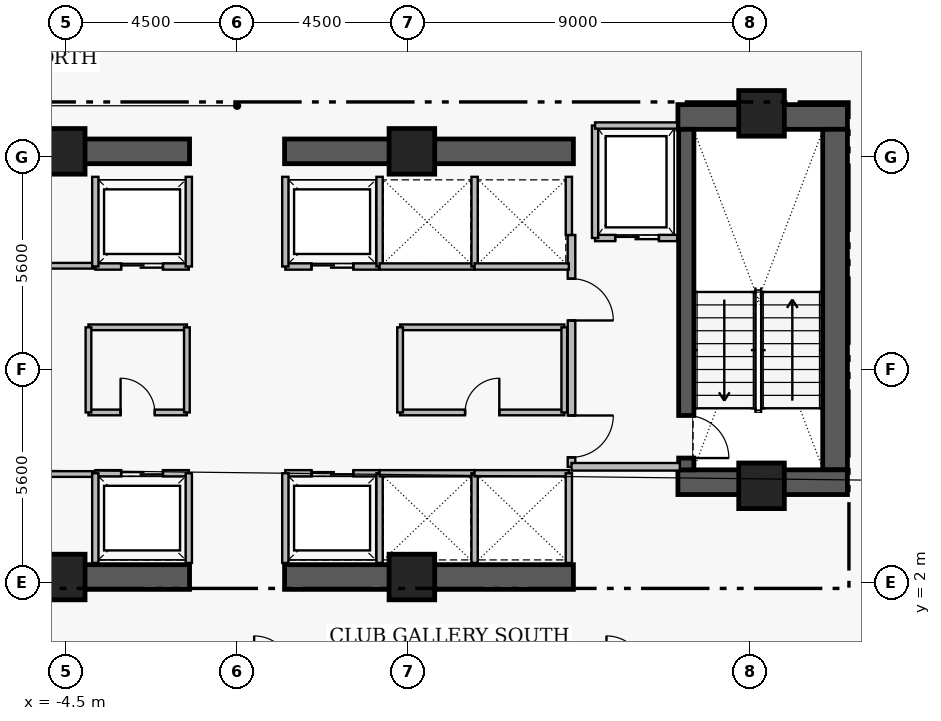
"""IFC4 building model, lengths in metres.
Left out: names, types, materials, properties, quantities, classifications, styles, units other than length and angle.
Written with IfcOpenShell. Run it as: python <this file> out.ifc"""

import sys

from ifc_helpers import new_model, si_unit, direction, frame, frame_2d, origin, origin_2d, place, context, subcontext, project, spatial, rectangle, extrude, element, fill, save


model = new_model("IFC4")
c1 = context("Model", 3, precision=1e-05, world=origin(), true_north=direction((0.0, 1.0)))
c2 = subcontext(c1, "Body", "Model", "MODEL_VIEW")
j1 = project(units=[si_unit("LENGTHUNIT", "METRE"), si_unit("PLANEANGLEUNIT", "RADIAN")], contexts=[c1])
p1 = place(None, origin())
s1 = spatial("IfcSite", under=j1, at=p1, CompositionType="ELEMENT")
p2 = place(p1, origin())
s2 = spatial("IfcBuilding", under=s1, at=p2, CompositionType="ELEMENT")
p3 = place(p2, frame((0.0, 0.0, 181.15)))
s3 = spatial("IfcBuildingStorey", under=s2, at=p3, CompositionType="ELEMENT", Elevation=181.15)
p4 = place(p3, frame((11.6, 14.255, 0.0), z_axis=(0.0, 0.0, 1.0), x_axis=(1.0, 0.0, 0.0)))
e1 = element("IfcWall", 1, at=p4, inside=s3, PredefinedType="SHEAR", context=c2, shape_type="SweptSolid", body=[
    extrude(rectangle(XDim=4.46, YDim=0.65, at=frame_2d((2.23, 0.0))), origin(), (0.0, 0.0, 1.0), 3.56),
])
p5 = place(p3, frame((15.735, 4.97, 0.0), z_axis=(0.0, 0.0, 1.0), x_axis=(0.0, 1.0, 0.0)))
e2 = element("IfcWall", 2, at=p5, inside=s3, PredefinedType="SHEAR", context=c2, shape_type="SweptSolid", body=[
    extrude(rectangle(XDim=8.96, YDim=0.65, at=frame_2d((4.48, 0.0))), origin(), (0.0, 0.0, 1.0), 3.56),
])
p6 = place(p3, frame((11.6, 4.645, 0.0), z_axis=(0.0, 0.0, 1.0), x_axis=(1.0, 0.0, 0.0)))
e3 = element("IfcWall", 3, at=p6, inside=s3, PredefinedType="SHEAR", context=c2, shape_type="SweptSolid", body=[
    extrude(rectangle(XDim=4.46, YDim=0.65, at=frame_2d((2.23, 0.0))), origin(), (0.0, 0.0, 1.0), 3.56),
])
for number, where, z_axis, x_axis in (
    (4, (-8.85, 2.15, 0.0), (0.0, 0.0, 1.0), (1.0, 0.0, 0.0)),
    (5, (1.25, 2.15, 0.0), (0.0, 0.0, 1.0), (1.0, 0.0, 0.0)),
    (6, (-8.85, 13.35, 0.0), (0.0, 0.0, 1.0), (1.0, 0.0, 0.0)),
    (7, (1.25, 13.35, 0.0), (0.0, 0.0, 1.0), (1.0, 0.0, 0.0)),
):
    element("IfcWall", number, at=place(p3, frame(where, z_axis=z_axis, x_axis=x_axis)), inside=s3, PredefinedType="SHEAR", context=c2, shape_type="SweptSolid", body=[
        extrude(rectangle(XDim=7.6, YDim=0.65, at=frame_2d((3.8, 0.0))), origin(), (0.0, 0.0, 1.0), 3.53),
    ])
p7 = place(p3, frame((11.82, 13.93, 0.0), z_axis=(0.0, 0.0, 1.0), x_axis=(0.0, -1.0, 0.0)))
e8 = element("IfcWall", 8, at=p7, inside=s3, PredefinedType="SHEAR", context=c2, shape_type="SweptSolid", body=[
    extrude(rectangle(XDim=8.96, YDim=0.4, at=frame_2d((4.48, 0.0))), origin(), (0.0, 0.0, 1.0), 3.56),
])
p8 = place(p7, frame((7.53, 0.0, 0.0)))
e9 = element("IfcOpeningElement", 9, at=p8, cuts=e8, PredefinedType="OPENING", context=c2, shape_type="SweptSolid", body=[
    extrude(rectangle(XDim=1.12, YDim=2.22, at=frame_2d((0.56, 1.11))), frame((0.0, 0.21, 0.0), z_axis=(0.0, -1.0, 0.0), x_axis=(1.0, 0.0, 0.0)), (0.0, 0.0, 1.0), 0.42),
])
for number, where, z_axis, x_axis in (
    (10, (-4.6, 13.35, 0.0), (0.0, 0.0, 1.0), (1.0, 0.0, 0.0)),
    (11, (4.6, 13.35, 0.0), (0.0, 0.0, 1.0), (1.0, 0.0, 0.0)),
    (12, (13.8, 14.35, 0.0), (0.0, 0.0, 1.0), (1.0, 0.0, 0.0)),
    (13, (-4.6, 2.15, 0.0), (0.0, 0.0, 1.0), (1.0, 0.0, 0.0)),
    (14, (4.6, 2.15, 0.0), (0.0, 0.0, 1.0), (1.0, 0.0, 0.0)),
    (15, (13.8, 4.55, 0.0), (0.0, 0.0, 1.0), (1.0, 0.0, 0.0)),
):
    element("IfcColumn", number, at=place(p3, frame(where, z_axis=z_axis, x_axis=x_axis)), inside=s3, PredefinedType="COLUMN", context=c2, shape_type="SweptSolid", body=[
        extrude(rectangle(XDim=1.2, YDim=1.2, at=origin_2d()), origin(), (0.0, 0.0, 1.0), 3.75),
    ])
p9 = place(p3, frame((8.8, 11.15, 0.0), z_axis=(0.0, 0.0, 1.0), x_axis=(0.0, -1.0, 0.0)))
e16 = element("IfcWall", 16, at=p9, inside=s3, PredefinedType="PARTITIONING", context=c2, shape_type="SweptSolid", body=[
    extrude(rectangle(XDim=6.1, YDim=0.2, at=frame_2d((3.05, 0.0))), origin(), (0.0, 0.0, 1.0), 3.53),
])
p10 = place(p9, frame((1.15, 0.0, 0.0)))
e17 = element("IfcOpeningElement", 17, at=p10, cuts=e16, PredefinedType="OPENING", context=c2, shape_type="SweptSolid", body=[
    extrude(rectangle(XDim=1.1, YDim=2.2, at=frame_2d((0.55, 1.1))), frame((0.0, 0.11, 0.0), z_axis=(0.0, -1.0, 0.0), x_axis=(1.0, 0.0, 0.0)), (0.0, 0.0, 1.0), 0.22),
])
p11 = place(p9, frame((4.75, 0.0, 0.0)))
e18 = element("IfcOpeningElement", 18, at=p11, cuts=e16, PredefinedType="OPENING", context=c2, shape_type="SweptSolid", body=[
    extrude(rectangle(XDim=1.1, YDim=2.2, at=frame_2d((0.55, 1.1))), frame((0.0, 0.11, 0.0), z_axis=(0.0, -1.0, 0.0), x_axis=(1.0, 0.0, 0.0)), (0.0, 0.0, 1.0), 0.22),
])
p12 = place(p3, frame((9.42, 11.07, 0.0), z_axis=(0.0, 0.0, 1.0), x_axis=(1.0, 0.0, 0.0)))
e19 = element("IfcWall", 19, at=p12, inside=s3, PredefinedType="PARTITIONING", context=c2, shape_type="SweptSolid", body=[
    extrude(rectangle(XDim=2.16, YDim=0.165, at=frame_2d((1.08, 0.0))), origin(), (0.0, 0.0, 1.0), 3.53),
])
p13 = place(p12, frame((0.53, 0.0, 0.0)))
e20 = element("IfcOpeningElement", 20, at=p13, cuts=e19, PredefinedType="OPENING", context=c2, shape_type="SweptSolid", body=[
    extrude(rectangle(XDim=1.15, YDim=2.25, at=frame_2d((0.575, 1.125))), frame((0.0, 0.093, 0.0), z_axis=(0.0, -1.0, 0.0), x_axis=(1.0, 0.0, 0.0)), (0.0, 0.0, 1.0), 0.185),
])
p14 = place(p3, frame((-3.73, 4.88, 0.0), z_axis=(0.0, 0.0, 1.0), x_axis=(1.0, 0.0, 0.0)))
e21 = element("IfcWall", 21, at=p14, inside=s3, PredefinedType="PARTITIONING", context=c2, shape_type="SweptSolid", body=[
    extrude(rectangle(XDim=2.46, YDim=0.165, at=frame_2d((1.23, 0.0))), origin(), (0.0, 0.0, 1.0), 3.53),
])
p15 = place(p14, frame((0.68, 0.0, 0.0)))
e22 = element("IfcOpeningElement", 22, at=p15, cuts=e21, PredefinedType="OPENING", context=c2, shape_type="SweptSolid", body=[
    extrude(rectangle(XDim=1.1, YDim=2.25, at=frame_2d((0.55, 1.125))), frame((0.0, 0.093, 0.0), z_axis=(0.0, -1.0, 0.0), x_axis=(1.0, 0.0, 0.0)), (0.0, 0.0, 1.0), 0.185),
])
p16 = place(p3, frame((1.27, 4.88, 0.0), z_axis=(0.0, 0.0, 1.0), x_axis=(1.0, 0.0, 0.0)))
e23 = element("IfcWall", 23, at=p16, inside=s3, PredefinedType="PARTITIONING", context=c2, shape_type="SweptSolid", body=[
    extrude(rectangle(XDim=2.48, YDim=0.165, at=frame_2d((1.24, 0.0))), origin(), (0.0, 0.0, 1.0), 3.53),
])
p17 = place(p16, frame((0.69, 0.0, 0.0)))
e24 = element("IfcOpeningElement", 24, at=p17, cuts=e23, PredefinedType="OPENING", context=c2, shape_type="SweptSolid", body=[
    extrude(rectangle(XDim=1.1, YDim=2.25, at=frame_2d((0.55, 1.125))), frame((0.0, 0.093, 0.0), z_axis=(0.0, -1.0, 0.0), x_axis=(1.0, 0.0, 0.0)), (0.0, 0.0, 1.0), 0.185),
])
p18 = place(p3, frame((-3.73, 10.32, 0.0), z_axis=(0.0, 0.0, 1.0), x_axis=(1.0, 0.0, 0.0)))
e25 = element("IfcWall", 25, at=p18, inside=s3, PredefinedType="PARTITIONING", context=c2, shape_type="SweptSolid", body=[
    extrude(rectangle(XDim=2.46, YDim=0.165, at=frame_2d((1.23, 0.0))), origin(), (0.0, 0.0, 1.0), 3.53),
])
p19 = place(p18, frame((0.68, 0.0, 0.0)))
e26 = element("IfcOpeningElement", 26, at=p19, cuts=e25, PredefinedType="OPENING", context=c2, shape_type="SweptSolid", body=[
    extrude(rectangle(XDim=1.1, YDim=2.25, at=frame_2d((0.55, 1.125))), frame((0.0, 0.093, 0.0), z_axis=(0.0, -1.0, 0.0), x_axis=(1.0, 0.0, 0.0)), (0.0, 0.0, 1.0), 0.185),
])
p20 = place(p3, frame((1.27, 10.32, 0.0), z_axis=(0.0, 0.0, 1.0), x_axis=(1.0, 0.0, 0.0)))
e27 = element("IfcWall", 27, at=p20, inside=s3, PredefinedType="PARTITIONING", context=c2, shape_type="SweptSolid", body=[
    extrude(rectangle(XDim=2.48, YDim=0.165, at=frame_2d((1.24, 0.0))), origin(), (0.0, 0.0, 1.0), 3.53),
])
p21 = place(p20, frame((0.69, 0.0, 0.0)))
e28 = element("IfcOpeningElement", 28, at=p21, cuts=e27, PredefinedType="OPENING", context=c2, shape_type="SweptSolid", body=[
    extrude(rectangle(XDim=1.1, YDim=2.25, at=frame_2d((0.55, 1.125))), frame((0.0, 0.093, 0.0), z_axis=(0.0, -1.0, 0.0), x_axis=(1.0, 0.0, 0.0)), (0.0, 0.0, 1.0), 0.185),
])
p22 = place(p3, frame((-8.71, 4.86, 0.0), z_axis=(0.0, 0.0, 1.0), x_axis=(1.0, 0.0, 0.0)))
e29 = element("IfcWall", 29, at=p22, inside=s3, PredefinedType="PARTITIONING", context=c2, shape_type="SweptSolid", body=[
    extrude(rectangle(XDim=4.92, YDim=0.15, at=frame_2d((2.46, 0.0))), origin(), (0.0, 0.0, 1.0), 3.53),
])
p23 = place(p22, frame((2.01, 0.0, 0.0)))
e30 = element("IfcOpeningElement", 30, at=p23, cuts=e29, PredefinedType="OPENING", context=c2, shape_type="SweptSolid", body=[
    extrude(rectangle(XDim=0.9, YDim=2.15, at=frame_2d((0.45, 1.075))), frame((0.0, 0.085, 0.0), z_axis=(0.0, -1.0, 0.0), x_axis=(1.0, 0.0, 0.0)), (0.0, 0.0, 1.0), 0.17),
])
p24 = place(p3, frame((-8.31, 10.34, 0.0), z_axis=(0.0, 0.0, 1.0), x_axis=(1.0, 0.0, 0.0)))
e31 = element("IfcWall", 31, at=p24, inside=s3, PredefinedType="PARTITIONING", context=c2, shape_type="SweptSolid", body=[
    extrude(rectangle(XDim=4.52, YDim=0.15, at=frame_2d((2.26, 0.0))), origin(), (0.0, 0.0, 1.0), 3.53),
])
p25 = place(p24, frame((1.81, 0.0, 0.0)))
e32 = element("IfcOpeningElement", 32, at=p25, cuts=e31, PredefinedType="OPENING", context=c2, shape_type="SweptSolid", body=[
    extrude(rectangle(XDim=0.9, YDim=2.15, at=frame_2d((0.45, 1.075))), frame((0.0, 0.085, 0.0), z_axis=(0.0, -1.0, 0.0), x_axis=(1.0, 0.0, 0.0)), (0.0, 0.0, 1.0), 0.17),
])
p26 = place(p3, frame((-3.91, 6.48, 0.0), z_axis=(0.0, 0.0, 1.0), x_axis=(1.0, 0.0, 0.0)))
e33 = element("IfcWall", 33, at=p26, inside=s3, PredefinedType="PARTITIONING", context=c2, shape_type="SweptSolid", body=[
    extrude(rectangle(XDim=2.59, YDim=0.15, at=frame_2d((1.295, 0.0))), origin(), (0.0, 0.0, 1.0), 3.53),
])
p27 = place(p26, frame((0.845, 0.0, 0.0)))
e34 = element("IfcOpeningElement", 34, at=p27, cuts=e33, PredefinedType="OPENING", context=c2, shape_type="SweptSolid", body=[
    extrude(rectangle(XDim=0.9, YDim=2.15, at=frame_2d((0.45, 1.075))), frame((0.0, 0.085, 0.0), z_axis=(0.0, -1.0, 0.0), x_axis=(1.0, 0.0, 0.0)), (0.0, 0.0, 1.0), 0.17),
])
p28 = place(p3, frame((4.29, 6.48, 0.0), z_axis=(0.0, 0.0, 1.0), x_axis=(1.0, 0.0, 0.0)))
e35 = element("IfcWall", 35, at=p28, inside=s3, PredefinedType="PARTITIONING", context=c2, shape_type="SweptSolid", body=[
    extrude(rectangle(XDim=4.32, YDim=0.15, at=frame_2d((2.16, 0.0))), origin(), (0.0, 0.0, 1.0), 3.53),
])
p29 = place(p28, frame((1.71, 0.0, 0.0)))
e36 = element("IfcOpeningElement", 36, at=p29, cuts=e35, PredefinedType="OPENING", context=c2, shape_type="SweptSolid", body=[
    extrude(rectangle(XDim=0.9, YDim=2.15, at=frame_2d((0.45, 1.075))), frame((0.0, 0.085, 0.0), z_axis=(0.0, -1.0, 0.0), x_axis=(1.0, 0.0, 0.0)), (0.0, 0.0, 1.0), 0.17),
])
p30 = place(p3, frame((8.8, 5.05, 0.0), z_axis=(0.0, 0.0, 1.0), x_axis=(1.0, 0.0, 0.0)))
e37 = element("IfcWall", 37, at=p30, inside=s3, PredefinedType="PARTITIONING", context=c2, shape_type="SweptSolid", body=[
    extrude(rectangle(XDim=2.85, YDim=0.2, at=frame_2d((1.425, 0.0))), origin(), (0.0, 0.0, 1.0), 3.53),
])
p31 = place(p3, frame((9.42, 11.07, 0.0), z_axis=(0.0, 0.0, 1.0), x_axis=(0.0, 1.0, 0.0)))
e38 = element("IfcWall", 38, at=p31, inside=s3, PredefinedType="PARTITIONING", context=c2, shape_type="SweptSolid", body=[
    extrude(rectangle(XDim=2.96, YDim=0.165, at=frame_2d((1.48, 0.0))), origin(), (0.0, 0.0, 1.0), 3.53),
])
p32 = place(p3, frame((9.42, 14.03, 0.0), z_axis=(0.0, 0.0, 1.0), x_axis=(1.0, 0.0, 0.0)))
e39 = element("IfcWall", 39, at=p32, inside=s3, PredefinedType="PARTITIONING", context=c2, shape_type="SweptSolid", body=[
    extrude(rectangle(XDim=2.16, YDim=0.165, at=frame_2d((1.08, 0.0))), origin(), (0.0, 0.0, 1.0), 3.53),
])
for number, where, z_axis, x_axis in (
    (40, (-3.73, 2.52, 0.0), (0.0, 0.0, 1.0), (0.0, 1.0, 0.0)),
    (41, (-1.27, 2.52, 0.0), (0.0, 0.0, 1.0), (0.0, 1.0, 0.0)),
    (42, (1.27, 2.52, 0.0), (0.0, 0.0, 1.0), (0.0, 1.0, 0.0)),
    (43, (3.75, 2.52, 0.0), (0.0, 0.0, 1.0), (0.0, 1.0, 0.0)),
    (44, (-3.73, 10.32, 0.0), (0.0, 0.0, 1.0), (0.0, 1.0, 0.0)),
    (45, (-1.27, 10.32, 0.0), (0.0, 0.0, 1.0), (0.0, 1.0, 0.0)),
    (46, (1.27, 10.32, 0.0), (0.0, 0.0, 1.0), (0.0, 1.0, 0.0)),
    (47, (3.75, 10.32, 0.0), (0.0, 0.0, 1.0), (0.0, 1.0, 0.0)),
):
    element("IfcWall", number, at=place(p3, frame(where, z_axis=z_axis, x_axis=x_axis)), inside=s3, PredefinedType="PARTITIONING", context=c2, shape_type="SweptSolid", body=[
        extrude(rectangle(XDim=2.36, YDim=0.165, at=frame_2d((1.18, 0.0))), origin(), (0.0, 0.0, 1.0), 3.53),
    ])
p33 = place(p3, frame((3.75, 4.88, 0.0), z_axis=(0.0, 0.0, 1.0), x_axis=(1.0, 0.0, 0.0)))
e48 = element("IfcWall", 48, at=p33, inside=s3, PredefinedType="PARTITIONING", context=c2, shape_type="SweptSolid", body=[
    extrude(rectangle(XDim=2.5, YDim=0.165, at=frame_2d((1.25, 0.0))), origin(), (0.0, 0.0, 1.0), 3.53),
])
p34 = place(p3, frame((6.25, 2.52, 0.0), z_axis=(0.0, 0.0, 1.0), x_axis=(0.0, 1.0, 0.0)))
e49 = element("IfcWall", 49, at=p34, inside=s3, PredefinedType="PARTITIONING", context=c2, shape_type="SweptSolid", body=[
    extrude(rectangle(XDim=2.36, YDim=0.165, at=frame_2d((1.18, 0.0))), origin(), (0.0, 0.0, 1.0), 3.53),
])
p35 = place(p3, frame((6.25, 4.88, 0.0), z_axis=(0.0, 0.0, 1.0), x_axis=(1.0, 0.0, 0.0)))
e50 = element("IfcWall", 50, at=p35, inside=s3, PredefinedType="PARTITIONING", context=c2, shape_type="SweptSolid", body=[
    extrude(rectangle(XDim=2.48, YDim=0.165, at=frame_2d((1.24, 0.0))), origin(), (0.0, 0.0, 1.0), 3.53),
])
p36 = place(p3, frame((8.73, 2.52, 0.0), z_axis=(0.0, 0.0, 1.0), x_axis=(0.0, 1.0, 0.0)))
e51 = element("IfcWall", 51, at=p36, inside=s3, PredefinedType="PARTITIONING", context=c2, shape_type="SweptSolid", body=[
    extrude(rectangle(XDim=2.36, YDim=0.165, at=frame_2d((1.18, 0.0))), origin(), (0.0, 0.0, 1.0), 3.53),
])
p37 = place(p3, frame((3.75, 10.32, 0.0), z_axis=(0.0, 0.0, 1.0), x_axis=(1.0, 0.0, 0.0)))
e52 = element("IfcWall", 52, at=p37, inside=s3, PredefinedType="PARTITIONING", context=c2, shape_type="SweptSolid", body=[
    extrude(rectangle(XDim=2.5, YDim=0.165, at=frame_2d((1.25, 0.0))), origin(), (0.0, 0.0, 1.0), 3.53),
])
p38 = place(p3, frame((6.25, 10.32, 0.0), z_axis=(0.0, 0.0, 1.0), x_axis=(0.0, 1.0, 0.0)))
e53 = element("IfcWall", 53, at=p38, inside=s3, PredefinedType="PARTITIONING", context=c2, shape_type="SweptSolid", body=[
    extrude(rectangle(XDim=2.36, YDim=0.165, at=frame_2d((1.18, 0.0))), origin(), (0.0, 0.0, 1.0), 3.53),
])
p39 = place(p3, frame((6.25, 10.32, 0.0), z_axis=(0.0, 0.0, 1.0), x_axis=(1.0, 0.0, 0.0)))
e54 = element("IfcWall", 54, at=p39, inside=s3, PredefinedType="PARTITIONING", context=c2, shape_type="SweptSolid", body=[
    extrude(rectangle(XDim=2.48, YDim=0.165, at=frame_2d((1.24, 0.0))), origin(), (0.0, 0.0, 1.0), 3.53),
])
p40 = place(p3, frame((8.73, 11.15, 0.0), z_axis=(0.0, 0.0, 1.0), x_axis=(0.0, 1.0, 0.0)))
e55 = element("IfcWall", 55, at=p40, inside=s3, PredefinedType="PARTITIONING", context=c2, shape_type="SweptSolid", body=[
    extrude(rectangle(XDim=1.53, YDim=0.165, at=frame_2d((0.765, 0.0))), origin(), (0.0, 0.0, 1.0), 3.53),
])
p41 = place(p3, frame((-3.91, 8.72, 0.0), z_axis=(0.0, 0.0, 1.0), x_axis=(1.0, 0.0, 0.0)))
e56 = element("IfcWall", 56, at=p41, inside=s3, PredefinedType="PARTITIONING", context=c2, shape_type="SweptSolid", body=[
    extrude(rectangle(XDim=2.59, YDim=0.15, at=frame_2d((1.295, 0.0))), origin(), (0.0, 0.0, 1.0), 3.53),
])
for number, where, z_axis, x_axis in (
    (57, (-3.91, 6.48, 0.0), (0.0, 0.0, 1.0), (0.0, 1.0, 0.0)),
    (58, (-1.32, 6.48, 0.0), (0.0, 0.0, 1.0), (0.0, 1.0, 0.0)),
):
    element("IfcWall", number, at=place(p3, frame(where, z_axis=z_axis, x_axis=x_axis)), inside=s3, PredefinedType="PARTITIONING", context=c2, shape_type="SweptSolid", body=[
        extrude(rectangle(XDim=2.24, YDim=0.15, at=frame_2d((1.12, 0.0))), origin(), (0.0, 0.0, 1.0), 3.53),
    ])
p42 = place(p3, frame((4.29, 8.72, 0.0), z_axis=(0.0, 0.0, 1.0), x_axis=(1.0, 0.0, 0.0)))
e59 = element("IfcWall", 59, at=p42, inside=s3, PredefinedType="PARTITIONING", context=c2, shape_type="SweptSolid", body=[
    extrude(rectangle(XDim=4.32, YDim=0.15, at=frame_2d((2.16, 0.0))), origin(), (0.0, 0.0, 1.0), 3.53),
])
for number, where, z_axis, x_axis in (
    (60, (4.29, 6.48, 0.0), (0.0, 0.0, 1.0), (0.0, 1.0, 0.0)),
    (61, (8.61, 6.48, 0.0), (0.0, 0.0, 1.0), (0.0, 1.0, 0.0)),
):
    element("IfcWall", number, at=place(p3, frame(where, z_axis=z_axis, x_axis=x_axis)), inside=s3, PredefinedType="PARTITIONING", context=c2, shape_type="SweptSolid", body=[
        extrude(rectangle(XDim=2.24, YDim=0.15, at=frame_2d((1.12, 0.0))), origin(), (0.0, 0.0, 1.0), 3.53),
    ])
p43 = place(p8, origin())
e62 = element("IfcDoor", 62, at=p43, inside=s3, OperationType="SINGLE_SWING_RIGHT", PredefinedType="DOOR", context=c2, shape_type="SweptSolid", body=[
    extrude(rectangle(XDim=1.12, YDim=2.22, at=frame_2d((0.56, 1.11))), frame((0.0, 0.025, 0.0), z_axis=(0.0, -1.0, 0.0), x_axis=(1.0, 0.0, 0.0)), (0.0, 0.0, 1.0), 0.05),
])
fill(e9, e62)
p44 = place(p10, origin())
e63 = element("IfcDoor", 63, at=p44, inside=s3, OperationType="SINGLE_SWING_RIGHT", PredefinedType="DOOR", context=c2, shape_type="SweptSolid", body=[
    extrude(rectangle(XDim=1.1, YDim=2.2, at=frame_2d((0.55, 1.1))), frame((0.0, 0.025, 0.0), z_axis=(0.0, -1.0, 0.0), x_axis=(1.0, 0.0, 0.0)), (0.0, 0.0, 1.0), 0.05),
])
fill(e17, e63)
p45 = place(p11, origin())
e64 = element("IfcDoor", 64, at=p45, inside=s3, OperationType="SINGLE_SWING_LEFT", PredefinedType="DOOR", context=c2, shape_type="SweptSolid", body=[
    extrude(rectangle(XDim=1.1, YDim=2.2, at=frame_2d((0.55, 1.1))), frame((0.0, 0.025, 0.0), z_axis=(0.0, -1.0, 0.0), x_axis=(1.0, 0.0, 0.0)), (0.0, 0.0, 1.0), 0.05),
])
fill(e18, e64)
p46 = place(p13, origin())
e65 = element("IfcDoor", 65, at=p46, inside=s3, OperationType="SLIDING_TO_LEFT", PredefinedType="DOOR", context=c2, shape_type="SweptSolid", body=[
    extrude(rectangle(XDim=1.15, YDim=2.25, at=frame_2d((0.575, 1.125))), frame((0.0, 0.025, 0.0), z_axis=(0.0, -1.0, 0.0), x_axis=(1.0, 0.0, 0.0)), (0.0, 0.0, 1.0), 0.05),
])
fill(e20, e65)
p47 = place(p15, origin())
e66 = element("IfcDoor", 66, at=p47, inside=s3, OperationType="SLIDING_TO_LEFT", PredefinedType="DOOR", context=c2, shape_type="SweptSolid", body=[
    extrude(rectangle(XDim=1.1, YDim=2.25, at=frame_2d((0.55, 1.125))), frame((0.0, 0.025, 0.0), z_axis=(0.0, -1.0, 0.0), x_axis=(1.0, 0.0, 0.0)), (0.0, 0.0, 1.0), 0.05),
])
fill(e22, e66)
p48 = place(p17, origin())
e67 = element("IfcDoor", 67, at=p48, inside=s3, OperationType="SLIDING_TO_LEFT", PredefinedType="DOOR", context=c2, shape_type="SweptSolid", body=[
    extrude(rectangle(XDim=1.1, YDim=2.25, at=frame_2d((0.55, 1.125))), frame((0.0, 0.025, 0.0), z_axis=(0.0, -1.0, 0.0), x_axis=(1.0, 0.0, 0.0)), (0.0, 0.0, 1.0), 0.05),
])
fill(e24, e67)
p49 = place(p19, origin())
e68 = element("IfcDoor", 68, at=p49, inside=s3, OperationType="SLIDING_TO_LEFT", PredefinedType="DOOR", context=c2, shape_type="SweptSolid", body=[
    extrude(rectangle(XDim=1.1, YDim=2.25, at=frame_2d((0.55, 1.125))), frame((0.0, 0.025, 0.0), z_axis=(0.0, -1.0, 0.0), x_axis=(1.0, 0.0, 0.0)), (0.0, 0.0, 1.0), 0.05),
])
fill(e26, e68)
p50 = place(p21, origin())
e69 = element("IfcDoor", 69, at=p50, inside=s3, OperationType="SLIDING_TO_LEFT", PredefinedType="DOOR", context=c2, shape_type="SweptSolid", body=[
    extrude(rectangle(XDim=1.1, YDim=2.25, at=frame_2d((0.55, 1.125))), frame((0.0, 0.025, 0.0), z_axis=(0.0, -1.0, 0.0), x_axis=(1.0, 0.0, 0.0)), (0.0, 0.0, 1.0), 0.05),
])
fill(e28, e69)
p51 = place(p27, origin())
e70 = element("IfcDoor", 70, at=p51, inside=s3, OperationType="SINGLE_SWING_LEFT", PredefinedType="DOOR", context=c2, shape_type="SweptSolid", body=[
    extrude(rectangle(XDim=0.9, YDim=2.15, at=frame_2d((0.45, 1.075))), frame((0.0, 0.025, 0.0), z_axis=(0.0, -1.0, 0.0), x_axis=(1.0, 0.0, 0.0)), (0.0, 0.0, 1.0), 0.05),
])
fill(e34, e70)
p52 = place(p29, origin())
e71 = element("IfcDoor", 71, at=p52, inside=s3, OperationType="SINGLE_SWING_RIGHT", PredefinedType="DOOR", context=c2, shape_type="SweptSolid", body=[
    extrude(rectangle(XDim=0.9, YDim=2.15, at=frame_2d((0.45, 1.075))), frame((0.0, 0.025, 0.0), z_axis=(0.0, -1.0, 0.0), x_axis=(1.0, 0.0, 0.0)), (0.0, 0.0, 1.0), 0.05),
])
fill(e36, e71)
save(model, sys.argv[1])
